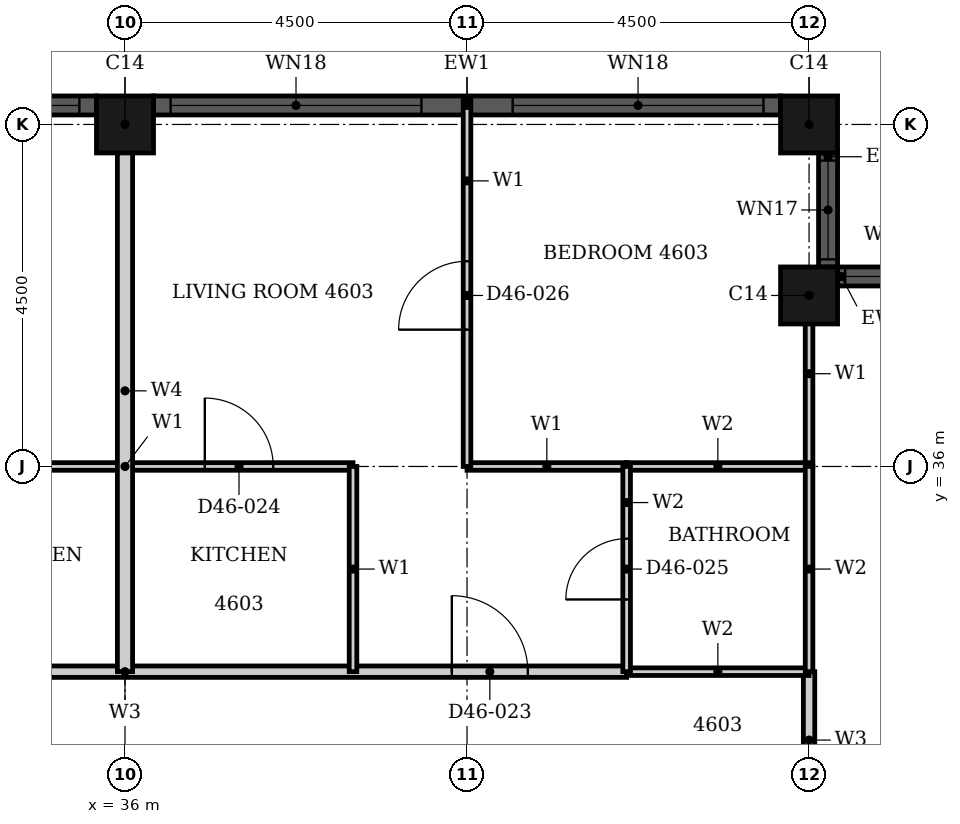
"""IFC4 building model, lengths in metres.
Left out: names, types, materials, properties, quantities, classifications, styles, units other than length and angle.
Written with IfcOpenShell. Run it as: python <this file> out.ifc"""

import sys

from ifc_helpers import new_model, si_unit, direction, frame, frame_2d, origin, origin_2d, place, context, subcontext, project, spatial, rectangle, hollow_rectangle, extrude, element, fill, save


model = new_model("IFC4")
c1 = context("Model", 3, precision=1e-05, world=origin(), true_north=direction((0.0, 1.0)))
c2 = subcontext(c1, "Body", "Model", "MODEL_VIEW")
j1 = project(units=[si_unit("LENGTHUNIT", "METRE"), si_unit("PLANEANGLEUNIT", "RADIAN")], contexts=[c1])
p1 = place(None, origin())
s1 = spatial("IfcSite", under=j1, at=p1, CompositionType="ELEMENT")
p2 = place(p1, origin())
s2 = spatial("IfcBuilding", under=s1, at=p2, CompositionType="ELEMENT")
p3 = place(p2, frame((0.0, 0.0, 183.9)))
s3 = spatial("IfcBuildingStorey", under=s2, at=p3, CompositionType="ELEMENT", Elevation=183.9)
for number, where, z_axis, x_axis in (
    (1, (45.0, 38.25, 0.0), (0.0, 0.0, 1.0), (1.0, 0.0, 0.0)),
    (2, (45.0, 40.5, 0.0), (0.0, 0.0, 1.0), (1.0, 0.0, 0.0)),
    (3, (36.0, 40.5, 0.0), (0.0, 0.0, 1.0), (1.0, 0.0, 0.0)),
):
    element("IfcColumn", number, at=place(p3, frame(where, z_axis=z_axis, x_axis=x_axis)), inside=s3, PredefinedType="COLUMN", context=c2, shape_type="SweptSolid", body=[
        extrude(hollow_rectangle(XDim=0.75, YDim=0.75, WallThickness=0.024, at=origin_2d()), origin(), (0.0, 0.0, 1.0), 3.7),
    ])
p4 = place(p3, frame((46.875, 38.5, 0.0), z_axis=(0.0, 0.0, 1.0), x_axis=(-1.0, 0.0, 0.0)))
e4 = element("IfcWall", 4, at=p4, inside=s3, PredefinedType="SOLIDWALL", context=c2, shape_type="SweptSolid", body=[
    extrude(rectangle(XDim=1.5, YDim=0.25, at=frame_2d((0.75, 0.0))), origin(), (0.0, 0.0, 1.0), 3.7),
])
p5 = place(p4, frame((0.1, 0.0, 0.9)))
e5 = element("IfcOpeningElement", 5, at=p5, cuts=e4, PredefinedType="OPENING", context=c2, shape_type="SweptSolid", body=[
    extrude(rectangle(XDim=1.3, YDim=1.95, at=frame_2d((0.65, 0.975))), frame((0.0, 0.135, 0.0), z_axis=(0.0, -1.0, 0.0), x_axis=(1.0, 0.0, 0.0)), (0.0, 0.0, 1.0), 0.27),
])
p6 = place(p3, frame((45.25, 38.625, 0.0), z_axis=(0.0, 0.0, 1.0), x_axis=(0.0, 1.0, 0.0)))
e6 = element("IfcWall", 6, at=p6, inside=s3, PredefinedType="SOLIDWALL", context=c2, shape_type="SweptSolid", body=[
    extrude(rectangle(XDim=1.5, YDim=0.25, at=frame_2d((0.75, 0.0))), origin(), (0.0, 0.0, 1.0), 3.7),
])
p7 = place(p6, frame((0.1, 0.0, 0.9)))
e7 = element("IfcOpeningElement", 7, at=p7, cuts=e6, PredefinedType="OPENING", context=c2, shape_type="SweptSolid", body=[
    extrude(rectangle(XDim=1.3, YDim=1.95, at=frame_2d((0.65, 0.975))), frame((0.0, 0.135, 0.0), z_axis=(0.0, -1.0, 0.0), x_axis=(1.0, 0.0, 0.0)), (0.0, 0.0, 1.0), 0.27),
])
p8 = place(p3, frame((44.625, 40.75, 0.0), z_axis=(0.0, 0.0, 1.0), x_axis=(-1.0, 0.0, 0.0)))
e8 = element("IfcWall", 8, at=p8, inside=s3, PredefinedType="SOLIDWALL", context=c2, shape_type="SweptSolid", body=[
    extrude(rectangle(XDim=8.25, YDim=0.25, at=frame_2d((4.125, 0.0))), origin(), (0.0, 0.0, 1.0), 3.7),
])
p9 = place(p8, frame((0.225, 0.0, 0.45)))
e9 = element("IfcOpeningElement", 9, at=p9, cuts=e8, PredefinedType="OPENING", context=c2, shape_type="SweptSolid", body=[
    extrude(rectangle(XDim=3.3, YDim=2.4, at=frame_2d((1.65, 1.2))), frame((0.0, 0.135, 0.0), z_axis=(0.0, -1.0, 0.0), x_axis=(1.0, 0.0, 0.0)), (0.0, 0.0, 1.0), 0.27),
])
p10 = place(p8, frame((4.725, 0.0, 0.45)))
e10 = element("IfcOpeningElement", 10, at=p10, cuts=e8, PredefinedType="OPENING", context=c2, shape_type="SweptSolid", body=[
    extrude(rectangle(XDim=3.3, YDim=2.4, at=frame_2d((1.65, 1.2))), frame((0.0, 0.135, 0.0), z_axis=(0.0, -1.0, 0.0), x_axis=(1.0, 0.0, 0.0)), (0.0, 0.0, 1.0), 0.27),
])
p11 = place(p3, frame((35.625, 40.75, 0.0), z_axis=(0.0, 0.0, 1.0), x_axis=(-1.0, 0.0, 0.0)))
e11 = element("IfcWall", 11, at=p11, inside=s3, PredefinedType="SOLIDWALL", context=c2, shape_type="SweptSolid", body=[
    extrude(rectangle(XDim=8.25, YDim=0.25, at=frame_2d((4.125, 0.0))), origin(), (0.0, 0.0, 1.0), 3.7),
])
p12 = place(p11, frame((0.225, 0.0, 0.45)))
e12 = element("IfcOpeningElement", 12, at=p12, cuts=e11, PredefinedType="OPENING", context=c2, shape_type="SweptSolid", body=[
    extrude(rectangle(XDim=3.3, YDim=2.4, at=frame_2d((1.65, 1.2))), frame((0.0, 0.135, 0.0), z_axis=(0.0, -1.0, 0.0), x_axis=(1.0, 0.0, 0.0)), (0.0, 0.0, 1.0), 0.27),
])
p13 = place(p11, frame((4.725, 0.0, 0.45)))
e13 = element("IfcOpeningElement", 13, at=p13, cuts=e11, PredefinedType="OPENING", context=c2, shape_type="SweptSolid", body=[
    extrude(rectangle(XDim=3.3, YDim=2.4, at=frame_2d((1.65, 1.2))), frame((0.0, 0.135, 0.0), z_axis=(0.0, -1.0, 0.0), x_axis=(1.0, 0.0, 0.0)), (0.0, 0.0, 1.0), 0.27),
])
p14 = place(p3, frame((29.4, 33.3, 0.0), z_axis=(0.0, 0.0, 1.0), x_axis=(1.0, 0.0, 0.0)))
e14 = element("IfcWall", 14, at=p14, inside=s3, PredefinedType="PARTITIONING", context=c2, shape_type="SweptSolid", body=[
    extrude(rectangle(XDim=13.2, YDim=0.15, at=frame_2d((6.6, 0.0))), origin(), (0.0, 0.0, 1.0), 3.3),
])
p15 = place(p14, frame((1.3, 0.0, 0.0)))
e15 = element("IfcOpeningElement", 15, at=p15, cuts=e14, PredefinedType="OPENING", context=c2, shape_type="SweptSolid", body=[
    extrude(rectangle(XDim=1.0, YDim=2.2, at=frame_2d((0.5, 1.1))), frame((0.0, 0.085, 0.0), z_axis=(0.0, -1.0, 0.0), x_axis=(1.0, 0.0, 0.0)), (0.0, 0.0, 1.0), 0.17),
])
p16 = place(p14, frame((10.9, 0.0, 0.0)))
e16 = element("IfcOpeningElement", 16, at=p16, cuts=e14, PredefinedType="OPENING", context=c2, shape_type="SweptSolid", body=[
    extrude(rectangle(XDim=1.0, YDim=2.2, at=frame_2d((0.5, 1.1))), frame((0.0, 0.085, 0.0), z_axis=(0.0, -1.0, 0.0), x_axis=(1.0, 0.0, 0.0)), (0.0, 0.0, 1.0), 0.17),
])
p17 = place(p3, frame((45.0, 31.5, 0.0), z_axis=(0.0, 0.0, 1.0), x_axis=(0.0, 1.0, 0.0)))
e17 = element("IfcWall", 17, at=p17, inside=s3, PredefinedType="PARTITIONING", context=c2, shape_type="SweptSolid", body=[
    extrude(rectangle(XDim=1.8, YDim=0.15, at=frame_2d((0.9, 0.0))), origin(), (0.0, 0.0, 1.0), 3.3),
])
p18 = place(p3, frame((33.0, 36.0, 0.0), z_axis=(0.0, 0.0, 1.0), x_axis=(1.0, 0.0, 0.0)))
e18 = element("IfcWall", 18, at=p18, inside=s3, PredefinedType="PARTITIONING", context=c2, shape_type="SweptSolid", body=[
    extrude(rectangle(XDim=6.0, YDim=0.1, at=frame_2d((3.0, 0.0))), origin(), (0.0, 0.0, 1.0), 3.3),
])
p19 = place(p18, frame((1.05, 0.0, 0.0)))
e19 = element("IfcOpeningElement", 19, at=p19, cuts=e18, PredefinedType="OPENING", context=c2, shape_type="SweptSolid", body=[
    extrude(rectangle(XDim=0.9, YDim=2.1, at=frame_2d((0.45, 1.05))), frame((0.0, 0.06, 0.0), z_axis=(0.0, -1.0, 0.0), x_axis=(1.0, 0.0, 0.0)), (0.0, 0.0, 1.0), 0.12),
])
p20 = place(p18, frame((4.05, 0.0, 0.0)))
e20 = element("IfcOpeningElement", 20, at=p20, cuts=e18, PredefinedType="OPENING", context=c2, shape_type="SweptSolid", body=[
    extrude(rectangle(XDim=0.9, YDim=2.1, at=frame_2d((0.45, 1.05))), frame((0.0, 0.06, 0.0), z_axis=(0.0, -1.0, 0.0), x_axis=(1.0, 0.0, 0.0)), (0.0, 0.0, 1.0), 0.12),
])
p21 = place(p3, frame((40.5, 36.0, 0.0), z_axis=(0.0, 0.0, 1.0), x_axis=(1.0, 0.0, 0.0)))
e21 = element("IfcWall", 21, at=p21, inside=s3, PredefinedType="PARTITIONING", context=c2, shape_type="SweptSolid", body=[
    extrude(rectangle(XDim=2.1, YDim=0.1, at=frame_2d((1.05, 0.0))), origin(), (0.0, 0.0, 1.0), 3.3),
])
p22 = place(p3, frame((39.0, 33.3, 0.0), z_axis=(0.0, 0.0, 1.0), x_axis=(0.0, 1.0, 0.0)))
e22 = element("IfcWall", 22, at=p22, inside=s3, PredefinedType="PARTITIONING", context=c2, shape_type="SweptSolid", body=[
    extrude(rectangle(XDim=2.7, YDim=0.1, at=frame_2d((1.35, 0.0))), origin(), (0.0, 0.0, 1.0), 3.3),
])
p23 = place(p3, frame((40.5, 36.0, 0.0), z_axis=(0.0, 0.0, 1.0), x_axis=(0.0, 1.0, 0.0)))
e23 = element("IfcWall", 23, at=p23, inside=s3, PredefinedType="PARTITIONING", context=c2, shape_type="SweptSolid", body=[
    extrude(rectangle(XDim=4.815, YDim=0.1, at=frame_2d((2.407, 0.0))), origin(), (0.0, 0.0, 1.0), 3.3),
])
p24 = place(p23, frame((1.8, 0.0, 0.0)))
e24 = element("IfcOpeningElement", 24, at=p24, cuts=e23, PredefinedType="OPENING", context=c2, shape_type="SweptSolid", body=[
    extrude(rectangle(XDim=0.9, YDim=2.1, at=frame_2d((0.45, 1.05))), frame((0.0, 0.06, 0.0), z_axis=(0.0, -1.0, 0.0), x_axis=(1.0, 0.0, 0.0)), (0.0, 0.0, 1.0), 0.12),
])
p25 = place(p3, frame((45.0, 36.001, 0.0), z_axis=(0.0, 0.0, 1.0), x_axis=(0.0, 1.0, 0.0)))
e25 = element("IfcWall", 25, at=p25, inside=s3, PredefinedType="PARTITIONING", context=c2, shape_type="SweptSolid", body=[
    extrude(rectangle(XDim=2.439, YDim=0.1, at=frame_2d((1.219, 0.0))), origin(), (0.0, 0.0, 1.0), 3.3),
])
p26 = place(p3, frame((36.0, 33.3, 0.0), z_axis=(0.0, 0.0, 1.0), x_axis=(0.0, 1.0, 0.0)))
e26 = element("IfcWall", 26, at=p26, inside=s3, PredefinedType="PARTITIONING", context=c2, shape_type="SweptSolid", body=[
    extrude(rectangle(XDim=7.39, YDim=0.2, at=frame_2d((3.695, 0.0))), origin(), (0.0, 0.0, 1.0), 3.3),
])
for number, where, z_axis, x_axis in (
    (27, (42.6, 33.3, 0.0), (0.0, 0.0, 1.0), (1.0, 0.0, 0.0)),
    (28, (42.6, 36.0, 0.0), (0.0, 0.0, 1.0), (1.0, 0.0, 0.0)),
):
    element("IfcWall", number, at=place(p3, frame(where, z_axis=z_axis, x_axis=x_axis)), inside=s3, PredefinedType="PARTITIONING", context=c2, shape_type="SweptSolid", body=[
        extrude(rectangle(XDim=2.4, YDim=0.1, at=frame_2d((1.2, 0.0))), origin(), (0.0, 0.0, 1.0), 3.3),
    ])
p27 = place(p3, frame((42.6, 33.3, 0.0), z_axis=(0.0, 0.0, 1.0), x_axis=(0.0, 1.0, 0.0)))
e29 = element("IfcWall", 29, at=p27, inside=s3, PredefinedType="PARTITIONING", context=c2, shape_type="SweptSolid", body=[
    extrude(rectangle(XDim=2.7, YDim=0.1, at=frame_2d((1.35, 0.0))), origin(), (0.0, 0.0, 1.0), 3.3),
])
p28 = place(p27, frame((0.95, 0.0, 0.0)))
e30 = element("IfcOpeningElement", 30, at=p28, cuts=e29, PredefinedType="OPENING", context=c2, shape_type="SweptSolid", body=[
    extrude(rectangle(XDim=0.8, YDim=2.1, at=frame_2d((0.4, 1.05))), frame((0.0, 0.06, 0.0), z_axis=(0.0, -1.0, 0.0), x_axis=(1.0, 0.0, 0.0)), (0.0, 0.0, 1.0), 0.12),
])
p29 = place(p3, frame((45.0, 33.3, 0.0), z_axis=(0.0, 0.0, 1.0), x_axis=(0.0, 1.0, 0.0)))
e31 = element("IfcWall", 31, at=p29, inside=s3, PredefinedType="PARTITIONING", context=c2, shape_type="SweptSolid", body=[
    extrude(rectangle(XDim=2.7, YDim=0.1, at=frame_2d((1.35, 0.0))), origin(), (0.0, 0.0, 1.0), 3.3),
])
p30 = place(p5, origin())
e32 = element("IfcWindow", 32, at=p30, inside=s3, PartitioningType="SINGLE_PANEL", PredefinedType="WINDOW", context=c2, shape_type="SweptSolid", body=[
    extrude(rectangle(XDim=1.3, YDim=1.95, at=frame_2d((0.65, 0.975))), frame((0.0, 0.03, 0.0), z_axis=(0.0, -1.0, 0.0), x_axis=(1.0, 0.0, 0.0)), (0.0, 0.0, 1.0), 0.06),
])
fill(e5, e32)
p31 = place(p7, origin())
e33 = element("IfcWindow", 33, at=p31, inside=s3, PartitioningType="SINGLE_PANEL", PredefinedType="WINDOW", context=c2, shape_type="SweptSolid", body=[
    extrude(rectangle(XDim=1.3, YDim=1.95, at=frame_2d((0.65, 0.975))), frame((0.0, 0.03, 0.0), z_axis=(0.0, -1.0, 0.0), x_axis=(1.0, 0.0, 0.0)), (0.0, 0.0, 1.0), 0.06),
])
fill(e7, e33)
p32 = place(p9, origin())
e34 = element("IfcWindow", 34, at=p32, inside=s3, PartitioningType="SINGLE_PANEL", PredefinedType="WINDOW", context=c2, shape_type="SweptSolid", body=[
    extrude(rectangle(XDim=3.3, YDim=2.4, at=frame_2d((1.65, 1.2))), frame((0.0, 0.03, 0.0), z_axis=(0.0, -1.0, 0.0), x_axis=(1.0, 0.0, 0.0)), (0.0, 0.0, 1.0), 0.06),
])
fill(e9, e34)
p33 = place(p10, origin())
e35 = element("IfcWindow", 35, at=p33, inside=s3, PartitioningType="SINGLE_PANEL", PredefinedType="WINDOW", context=c2, shape_type="SweptSolid", body=[
    extrude(rectangle(XDim=3.3, YDim=2.4, at=frame_2d((1.65, 1.2))), frame((0.0, 0.03, 0.0), z_axis=(0.0, -1.0, 0.0), x_axis=(1.0, 0.0, 0.0)), (0.0, 0.0, 1.0), 0.06),
])
fill(e10, e35)
p34 = place(p12, origin())
e36 = element("IfcWindow", 36, at=p34, inside=s3, PartitioningType="SINGLE_PANEL", PredefinedType="WINDOW", context=c2, shape_type="SweptSolid", body=[
    extrude(rectangle(XDim=3.3, YDim=2.4, at=frame_2d((1.65, 1.2))), frame((0.0, 0.03, 0.0), z_axis=(0.0, -1.0, 0.0), x_axis=(1.0, 0.0, 0.0)), (0.0, 0.0, 1.0), 0.06),
])
fill(e12, e36)
p35 = place(p16, origin())
e37 = element("IfcDoor", 37, at=p35, inside=s3, OperationType="SINGLE_SWING_RIGHT", PredefinedType="DOOR", context=c2, shape_type="SweptSolid", body=[
    extrude(rectangle(XDim=1.0, YDim=2.2, at=frame_2d((0.5, 1.1))), frame((0.0, 0.025, 0.0), z_axis=(0.0, -1.0, 0.0), x_axis=(1.0, 0.0, 0.0)), (0.0, 0.0, 1.0), 0.05),
])
fill(e16, e37)
p36 = place(p20, origin())
e38 = element("IfcDoor", 38, at=p36, inside=s3, OperationType="SINGLE_SWING_RIGHT", PredefinedType="DOOR", context=c2, shape_type="SweptSolid", body=[
    extrude(rectangle(XDim=0.9, YDim=2.1, at=frame_2d((0.45, 1.05))), frame((0.0, 0.025, 0.0), z_axis=(0.0, -1.0, 0.0), x_axis=(1.0, 0.0, 0.0)), (0.0, 0.0, 1.0), 0.05),
])
fill(e20, e38)
p37 = place(p28, origin())
e39 = element("IfcDoor", 39, at=p37, inside=s3, OperationType="SINGLE_SWING_LEFT", PredefinedType="DOOR", context=c2, shape_type="SweptSolid", body=[
    extrude(rectangle(XDim=0.8, YDim=2.1, at=frame_2d((0.4, 1.05))), frame((0.0, 0.025, 0.0), z_axis=(0.0, -1.0, 0.0), x_axis=(1.0, 0.0, 0.0)), (0.0, 0.0, 1.0), 0.05),
])
fill(e30, e39)
p38 = place(p24, origin())
e40 = element("IfcDoor", 40, at=p38, inside=s3, OperationType="SINGLE_SWING_RIGHT", PredefinedType="DOOR", context=c2, shape_type="SweptSolid", body=[
    extrude(rectangle(XDim=0.9, YDim=2.1, at=frame_2d((0.45, 1.05))), frame((0.0, 0.025, 0.0), z_axis=(0.0, -1.0, 0.0), x_axis=(1.0, 0.0, 0.0)), (0.0, 0.0, 1.0), 0.05),
])
fill(e24, e40)
save(model, sys.argv[1])
